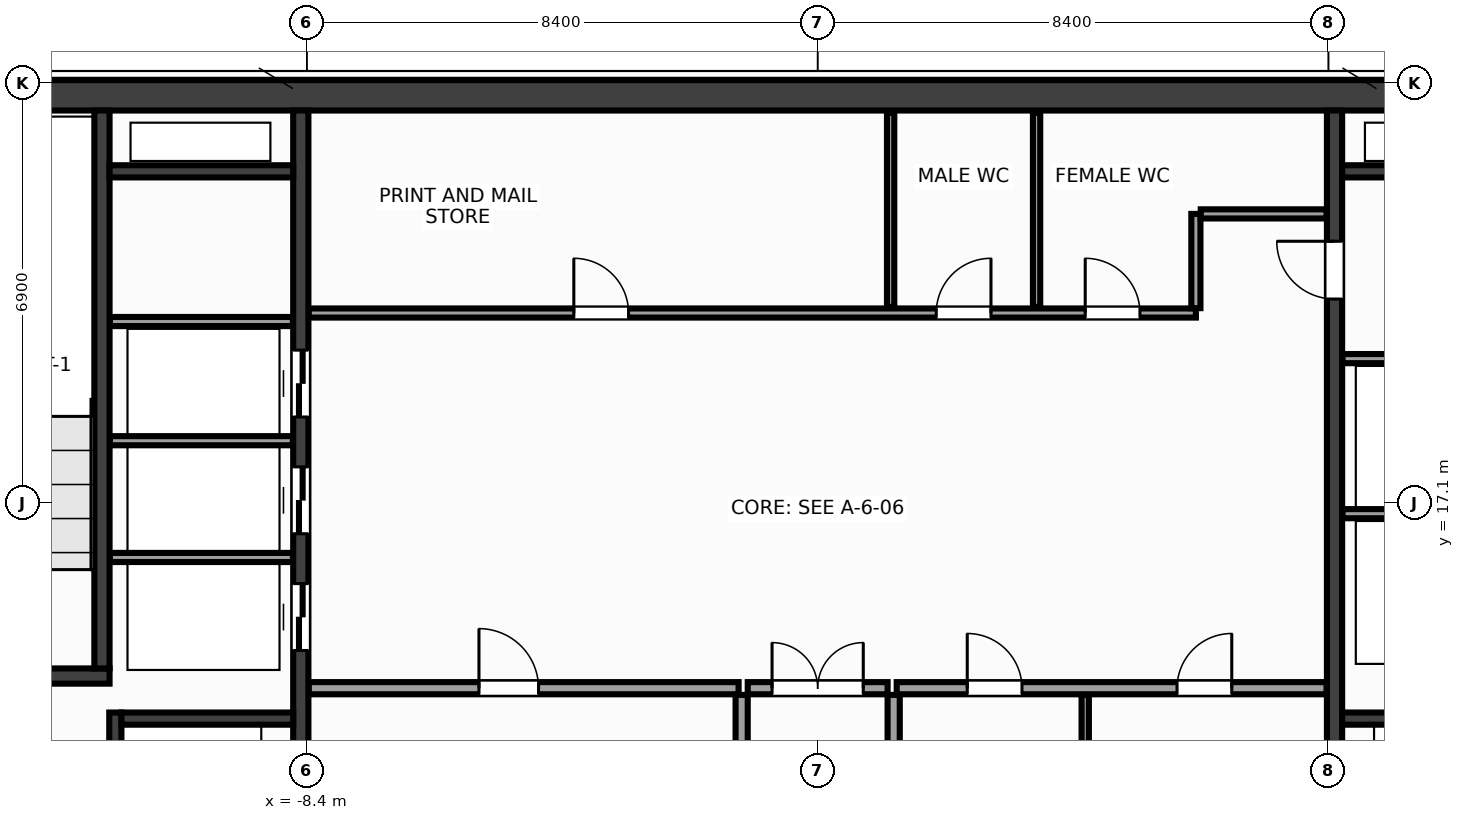
"""IFC4 building model, lengths in metres.
Left out: names, types, materials, properties, quantities, classifications, styles, units other than length and angle.
Written with IfcOpenShell. Run it as: python <this file> out.ifc"""

import sys

from ifc_helpers import new_model, si_unit, direction, frame, frame_2d, origin, place, context, subcontext, project, spatial, rectangle, extrude, source, transform, mapped, element, fill, save


model = new_model("IFC4")
c1 = context("Model", 3, precision=1e-05, world=origin(), true_north=direction((0.0, 1.0)))
c2 = subcontext(c1, "Body", "Model", "MODEL_VIEW")
j1 = project(units=[si_unit("LENGTHUNIT", "METRE"), si_unit("PLANEANGLEUNIT", "RADIAN")], contexts=[c1])
p1 = place(None, origin())
s1 = spatial("IfcSite", under=j1, at=p1, CompositionType="ELEMENT")
p2 = place(p1, origin())
s2 = spatial("IfcBuilding", under=s1, at=p2, CompositionType="ELEMENT")
p3 = place(p2, frame((0.0, 0.0, 279.2)))
s3 = spatial("IfcBuildingStorey", under=s2, at=p3, CompositionType="ELEMENT", Elevation=279.2)
m1 = source(origin(), c2, "Body", "SweptSolid", [
    extrude(rectangle(XDim=31.7, YDim=0.5, at=frame_2d((15.85, 0.0))), origin(), (0.0, 0.0, 1.0), 3.6),
])
p4 = place(p3, frame((-15.85, 23.8, 0.0), z_axis=(0.0, 0.0, 1.0), x_axis=(1.0, 0.0, 0.0)))
e1 = element("IfcWall", 1, at=p4, inside=s3, PredefinedType="SHEAR", context=c2, shape_type="MappedRepresentation", body=[
    mapped(m1, transform((0.0, 0.0, 0.0), x_axis=(1.0, 0.0, 0.0), y_axis=(0.0, 1.0, 0.0), z_axis=(0.0, 0.0, 1.0), scale=1.0)),
])
m2 = source(origin(), c2, "Body", "SweptSolid", [
    extrude(rectangle(XDim=13.1, YDim=0.25, at=frame_2d((6.55, 0.0))), origin(), (0.0, 0.0, 1.0), 3.6),
])
p5 = place(p3, frame((-8.5, 10.45, 0.0), z_axis=(0.0, 0.0, 1.0), x_axis=(0.0, 1.0, 0.0)))
e2 = element("IfcWall", 2, at=p5, inside=s3, PredefinedType="SHEAR", context=c2, shape_type="MappedRepresentation", body=[
    mapped(m2, transform((0.0, 0.0, 0.0), x_axis=(1.0, 0.0, 0.0), y_axis=(0.0, 1.0, 0.0), z_axis=(0.0, 0.0, 1.0), scale=1.0)),
])
p6 = place(p5, frame((4.22, 0.0, 0.0)))
e3 = element("IfcOpeningElement", 3, at=p6, cuts=e2, PredefinedType="OPENING", context=c2, shape_type="SweptSolid", body=[
    extrude(rectangle(XDim=1.1, YDim=2.15, at=frame_2d((0.55, 1.075))), frame((0.0, 0.137, 0.0), z_axis=(0.0, -1.0, 0.0), x_axis=(1.0, 0.0, 0.0)), (0.0, 0.0, 1.0), 0.274),
])
p7 = place(p5, frame((6.14, 0.0, 0.0)))
e4 = element("IfcOpeningElement", 4, at=p7, cuts=e2, PredefinedType="OPENING", context=c2, shape_type="SweptSolid", body=[
    extrude(rectangle(XDim=1.1, YDim=2.15, at=frame_2d((0.55, 1.075))), frame((0.0, 0.137, 0.0), z_axis=(0.0, -1.0, 0.0), x_axis=(1.0, 0.0, 0.0)), (0.0, 0.0, 1.0), 0.274),
])
p8 = place(p5, frame((8.06, 0.0, 0.0)))
e5 = element("IfcOpeningElement", 5, at=p8, cuts=e2, PredefinedType="OPENING", context=c2, shape_type="SweptSolid", body=[
    extrude(rectangle(XDim=1.1, YDim=2.15, at=frame_2d((0.55, 1.075))), frame((0.0, 0.137, 0.0), z_axis=(0.0, -1.0, 0.0), x_axis=(1.0, 0.0, 0.0)), (0.0, 0.0, 1.0), 0.274),
])
p9 = place(p3, frame((8.5, 10.45, 0.0), z_axis=(0.0, 0.0, 1.0), x_axis=(0.0, 1.0, 0.0)))
e6 = element("IfcWall", 6, at=p9, inside=s3, PredefinedType="SHEAR", context=c2, shape_type="MappedRepresentation", body=[
    mapped(m2, transform((0.0, 0.0, 0.0), x_axis=(1.0, 0.0, 0.0), y_axis=(0.0, 1.0, 0.0), z_axis=(0.0, 0.0, 1.0), scale=1.0)),
])
p10 = place(p9, frame((10.0, 0.0, 0.0)))
e7 = element("IfcOpeningElement", 7, at=p10, cuts=e6, PredefinedType="OPENING", context=c2, shape_type="SweptSolid", body=[
    extrude(rectangle(XDim=0.95, YDim=2.15, at=frame_2d((0.475, 1.075))), frame((0.0, 0.137, 0.0), z_axis=(0.0, -1.0, 0.0), x_axis=(1.0, 0.0, 0.0)), (0.0, 0.0, 1.0), 0.274),
])
m3 = source(origin(), c2, "Body", "SweptSolid", [
    extrude(rectangle(XDim=3.705, YDim=0.25, at=frame_2d((1.853, 0.0))), origin(), (0.0, 0.0, 1.0), 3.6),
])
p11 = place(p3, frame((-15.35, 14.25, 0.0), z_axis=(0.0, 0.0, 1.0), x_axis=(1.0, 0.0, 0.0)))
e8 = element("IfcWall", 8, at=p11, inside=s3, PredefinedType="SHEAR", context=c2, shape_type="MappedRepresentation", body=[
    mapped(m3, transform((0.0, 0.0, 0.0), x_axis=(1.0, 0.0, 0.0), y_axis=(0.0, 1.0, 0.0), z_axis=(0.0, 0.0, 1.0), scale=1.0)),
])
p12 = place(p11, frame((0.95, 0.0, 0.0)))
e9 = element("IfcOpeningElement", 9, at=p12, cuts=e8, PredefinedType="OPENING", context=c2, shape_type="SweptSolid", body=[
    extrude(rectangle(XDim=1.6, YDim=2.15, at=frame_2d((0.8, 1.075))), frame((0.0, 0.137, 0.0), z_axis=(0.0, -1.0, 0.0), x_axis=(1.0, 0.0, 0.0)), (0.0, 0.0, 1.0), 0.274),
])
m4 = source(origin(), c2, "Body", "SweptSolid", [
    extrude(rectangle(XDim=9.175, YDim=0.25, at=frame_2d((4.587, 0.0))), origin(), (0.0, 0.0, 1.0), 3.6),
])
p13 = place(p3, frame((-11.77, 14.375, 0.0), z_axis=(0.0, 0.0, 1.0), x_axis=(0.0, 1.0, 0.0)))
e10 = element("IfcWall", 10, at=p13, inside=s3, PredefinedType="SHEAR", context=c2, shape_type="MappedRepresentation", body=[
    mapped(m4, transform((0.0, 0.0, 0.0), x_axis=(1.0, 0.0, 0.0), y_axis=(0.0, 1.0, 0.0), z_axis=(0.0, 0.0, 1.0), scale=1.0)),
])
m5 = source(origin(), c2, "Body", "SweptSolid", [
    extrude(rectangle(XDim=3.2, YDim=0.2, at=frame_2d((1.6, 0.0))), origin(), (0.0, 0.0, 1.0), 3.6),
])
p14 = place(p3, frame((-11.55, 10.45, 0.0), z_axis=(0.0, 0.0, 1.0), x_axis=(0.0, 1.0, 0.0)))
e11 = element("IfcWall", 11, at=p14, inside=s3, PredefinedType="SHEAR", context=c2, shape_type="MappedRepresentation", body=[
    mapped(m5, transform((0.0, 0.0, 0.0), x_axis=(1.0, 0.0, 0.0), y_axis=(0.0, 1.0, 0.0), z_axis=(0.0, 0.0, 1.0), scale=1.0)),
])
p15 = place(p14, frame((0.9, 0.0, 0.0)))
e12 = element("IfcOpeningElement", 12, at=p15, cuts=e11, PredefinedType="OPENING", context=c2, shape_type="SweptSolid", body=[
    extrude(rectangle(XDim=1.1, YDim=2.15, at=frame_2d((0.55, 1.075))), frame((0.0, 0.112, 0.0), z_axis=(0.0, -1.0, 0.0), x_axis=(1.0, 0.0, 0.0)), (0.0, 0.0, 1.0), 0.224),
])
m6 = source(origin(), c2, "Body", "SweptSolid", [
    extrude(rectangle(XDim=2.825, YDim=0.2, at=frame_2d((1.413, 0.0))), origin(), (0.0, 0.0, 1.0), 3.6),
])
for number, where, z_axis, x_axis in (
    (13, (-11.45, 13.55, 0.0), (0.0, 0.0, 1.0), (1.0, 0.0, 0.0)),
    (14, (8.625, 13.55, 0.0), (0.0, 0.0, 1.0), (1.0, 0.0, 0.0)),
):
    element("IfcWall", number, at=place(p3, frame(where, z_axis=z_axis, x_axis=x_axis)), inside=s3, PredefinedType="SHEAR", context=c2, shape_type="MappedRepresentation", body=[
        mapped(m6, transform((0.0, 0.0, 0.0), x_axis=(1.0, 0.0, 0.0), y_axis=(0.0, 1.0, 0.0), z_axis=(0.0, 0.0, 1.0), scale=1.0)),
    ])
m7 = source(origin(), c2, "Body", "SweptSolid", [
    extrude(rectangle(XDim=3.02, YDim=0.2, at=frame_2d((1.51, 0.0))), origin(), (0.0, 0.0, 1.0), 3.6),
])
for number, where, z_axis, x_axis in (
    (15, (-11.645, 22.55, 0.0), (0.0, 0.0, 1.0), (1.0, 0.0, 0.0)),
    (16, (8.625, 22.55, 0.0), (0.0, 0.0, 1.0), (1.0, 0.0, 0.0)),
):
    element("IfcWall", number, at=place(p3, frame(where, z_axis=z_axis, x_axis=x_axis)), inside=s3, PredefinedType="SHEAR", context=c2, shape_type="MappedRepresentation", body=[
        mapped(m7, transform((0.0, 0.0, 0.0), x_axis=(1.0, 0.0, 0.0), y_axis=(0.0, 1.0, 0.0), z_axis=(0.0, 0.0, 1.0), scale=1.0)),
    ])
m8 = source(origin(), c2, "Body", "SweptSolid", [
    extrude(rectangle(XDim=3.01, YDim=0.15, at=frame_2d((1.505, 0.0))), origin(), (0.0, 0.0, 1.0), 3.37),
])
for number, where, z_axis, x_axis in (
    (17, (-11.64, 16.2, 0.0), (0.0, 0.0, 1.0), (1.0, 0.0, 0.0)),
    (18, (-11.64, 18.12, 0.0), (0.0, 0.0, 1.0), (1.0, 0.0, 0.0)),
    (19, (-11.64, 20.08, 0.0), (0.0, 0.0, 1.0), (1.0, 0.0, 0.0)),
    (20, (8.63, 16.92, 0.0), (0.0, 0.0, 1.0), (1.0, 0.0, 0.0)),
    (21, (8.63, 19.47, 0.0), (0.0, 0.0, 1.0), (1.0, 0.0, 0.0)),
):
    element("IfcWall", number, at=place(p3, frame(where, z_axis=z_axis, x_axis=x_axis)), inside=s3, PredefinedType="PARTITIONING", context=c2, shape_type="MappedRepresentation", body=[
        mapped(m8, transform((0.0, 0.0, 0.0), x_axis=(1.0, 0.0, 0.0), y_axis=(0.0, 1.0, 0.0), z_axis=(0.0, 0.0, 1.0), scale=1.0)),
    ])
m9 = source(origin(), c2, "Body", "SweptSolid", [
    extrude(rectangle(XDim=7.07, YDim=0.2, at=frame_2d((3.535, 0.0))), origin(), (0.0, 0.0, 1.0), 3.37),
])
p16 = place(p3, frame((-8.37, 14.05, 0.0), z_axis=(0.0, 0.0, 1.0), x_axis=(1.0, 0.0, 0.0)))
e22 = element("IfcWall", 22, at=p16, inside=s3, PredefinedType="PARTITIONING", context=c2, shape_type="MappedRepresentation", body=[
    mapped(m9, transform((0.0, 0.0, 0.0), x_axis=(1.0, 0.0, 0.0), y_axis=(0.0, 1.0, 0.0), z_axis=(0.0, 0.0, 1.0), scale=1.0)),
])
p17 = place(p16, frame((2.8, 0.0, 0.0)))
e23 = element("IfcOpeningElement", 23, at=p17, cuts=e22, PredefinedType="OPENING", context=c2, shape_type="SweptSolid", body=[
    extrude(rectangle(XDim=0.98, YDim=2.15, at=frame_2d((0.49, 1.075))), frame((0.0, 0.112, 0.0), z_axis=(0.0, -1.0, 0.0), x_axis=(1.0, 0.0, 0.0)), (0.0, 0.0, 1.0), 0.224),
])
p18 = place(p3, frame((1.3, 14.05, 0.0), z_axis=(0.0, 0.0, 1.0), x_axis=(1.0, 0.0, 0.0)))
e24 = element("IfcWall", 24, at=p18, inside=s3, PredefinedType="PARTITIONING", context=c2, shape_type="MappedRepresentation", body=[
    mapped(m9, transform((0.0, 0.0, 0.0), x_axis=(1.0, 0.0, 0.0), y_axis=(0.0, 1.0, 0.0), z_axis=(0.0, 0.0, 1.0), scale=1.0)),
])
p19 = place(p18, frame((1.16, 0.0, 0.0)))
e25 = element("IfcOpeningElement", 25, at=p19, cuts=e24, PredefinedType="OPENING", context=c2, shape_type="SweptSolid", body=[
    extrude(rectangle(XDim=0.9, YDim=2.15, at=frame_2d((0.45, 1.075))), frame((0.0, 0.112, 0.0), z_axis=(0.0, -1.0, 0.0), x_axis=(1.0, 0.0, 0.0)), (0.0, 0.0, 1.0), 0.224),
])
p20 = place(p18, frame((4.61, 0.0, 0.0)))
e26 = element("IfcOpeningElement", 26, at=p20, cuts=e24, PredefinedType="OPENING", context=c2, shape_type="SweptSolid", body=[
    extrude(rectangle(XDim=0.9, YDim=2.15, at=frame_2d((0.45, 1.075))), frame((0.0, 0.112, 0.0), z_axis=(0.0, -1.0, 0.0), x_axis=(1.0, 0.0, 0.0)), (0.0, 0.0, 1.0), 0.224),
])
m10 = source(origin(), c2, "Body", "SweptSolid", [
    extrude(rectangle(XDim=3.49, YDim=0.2, at=frame_2d((1.745, 0.0))), origin(), (0.0, 0.0, 1.0), 3.37),
])
for number, where, z_axis, x_axis in (
    (27, (-1.25, 10.45, 0.0), (0.0, 0.0, 1.0), (0.0, 1.0, 0.0)),
    (28, (1.25, 10.45, 0.0), (0.0, 0.0, 1.0), (0.0, 1.0, 0.0)),
):
    element("IfcWall", number, at=place(p3, frame(where, z_axis=z_axis, x_axis=x_axis)), inside=s3, PredefinedType="PARTITIONING", context=c2, shape_type="MappedRepresentation", body=[
        mapped(m10, transform((0.0, 0.0, 0.0), x_axis=(1.0, 0.0, 0.0), y_axis=(0.0, 1.0, 0.0), z_axis=(0.0, 0.0, 1.0), scale=1.0)),
    ])
m11 = source(origin(), c2, "Body", "SweptSolid", [
    extrude(rectangle(XDim=2.3, YDim=0.2, at=frame_2d((1.15, 0.0))), origin(), (0.0, 0.0, 1.0), 3.37),
])
p21 = place(p3, frame((-1.15, 14.05, 0.0), z_axis=(0.0, 0.0, 1.0), x_axis=(1.0, 0.0, 0.0)))
e29 = element("IfcWall", 29, at=p21, inside=s3, PredefinedType="PARTITIONING", context=c2, shape_type="MappedRepresentation", body=[
    mapped(m11, transform((0.0, 0.0, 0.0), x_axis=(1.0, 0.0, 0.0), y_axis=(0.0, 1.0, 0.0), z_axis=(0.0, 0.0, 1.0), scale=1.0)),
])
p22 = place(p21, frame((0.4, 0.0, 0.0)))
e30 = element("IfcOpeningElement", 30, at=p22, cuts=e29, PredefinedType="OPENING", context=c2, shape_type="SweptSolid", body=[
    extrude(rectangle(XDim=1.5, YDim=2.2, at=frame_2d((0.75, 1.1))), frame((0.0, 0.112, 0.0), z_axis=(0.0, -1.0, 0.0), x_axis=(1.0, 0.0, 0.0)), (0.0, 0.0, 1.0), 0.224),
])
m12 = source(origin(), c2, "Body", "SweptSolid", [
    extrude(rectangle(XDim=14.59, YDim=0.15, at=frame_2d((7.295, 0.0))), origin(), (0.0, 0.0, 1.0), 3.37),
])
p23 = place(p3, frame((-8.37, 20.22, 0.0), z_axis=(0.0, 0.0, 1.0), x_axis=(1.0, 0.0, 0.0)))
e31 = element("IfcWall", 31, at=p23, inside=s3, PredefinedType="PARTITIONING", context=c2, shape_type="MappedRepresentation", body=[
    mapped(m12, transform((0.0, 0.0, 0.0), x_axis=(1.0, 0.0, 0.0), y_axis=(0.0, 1.0, 0.0), z_axis=(0.0, 0.0, 1.0), scale=1.0)),
])
p24 = place(p23, frame((4.36, 0.0, 0.0)))
e32 = element("IfcOpeningElement", 32, at=p24, cuts=e31, PredefinedType="OPENING", context=c2, shape_type="SweptSolid", body=[
    extrude(rectangle(XDim=0.9, YDim=2.15, at=frame_2d((0.45, 1.075))), frame((0.0, 0.087, 0.0), z_axis=(0.0, -1.0, 0.0), x_axis=(1.0, 0.0, 0.0)), (0.0, 0.0, 1.0), 0.174),
])
p25 = place(p23, frame((10.32, 0.0, 0.0)))
e33 = element("IfcOpeningElement", 33, at=p25, cuts=e31, PredefinedType="OPENING", context=c2, shape_type="SweptSolid", body=[
    extrude(rectangle(XDim=0.9, YDim=2.15, at=frame_2d((0.45, 1.075))), frame((0.0, 0.087, 0.0), z_axis=(0.0, -1.0, 0.0), x_axis=(1.0, 0.0, 0.0)), (0.0, 0.0, 1.0), 0.174),
])
p26 = place(p23, frame((12.77, 0.0, 0.0)))
e34 = element("IfcOpeningElement", 34, at=p26, cuts=e31, PredefinedType="OPENING", context=c2, shape_type="SweptSolid", body=[
    extrude(rectangle(XDim=0.9, YDim=2.15, at=frame_2d((0.45, 1.075))), frame((0.0, 0.087, 0.0), z_axis=(0.0, -1.0, 0.0), x_axis=(1.0, 0.0, 0.0)), (0.0, 0.0, 1.0), 0.174),
])
m13 = source(origin(), c2, "Body", "SweptSolid", [
    extrude(rectangle(XDim=1.55, YDim=0.15, at=frame_2d((0.775, 0.0))), origin(), (0.0, 0.0, 1.0), 3.37),
])
p27 = place(p3, frame((6.22, 20.3, 0.0), z_axis=(0.0, 0.0, 1.0), x_axis=(0.0, 1.0, 0.0)))
e35 = element("IfcWall", 35, at=p27, inside=s3, PredefinedType="PARTITIONING", context=c2, shape_type="MappedRepresentation", body=[
    mapped(m13, transform((0.0, 0.0, 0.0), x_axis=(1.0, 0.0, 0.0), y_axis=(0.0, 1.0, 0.0), z_axis=(0.0, 0.0, 1.0), scale=1.0)),
])
m14 = source(origin(), c2, "Body", "SweptSolid", [
    extrude(rectangle(XDim=2.07, YDim=0.15, at=frame_2d((1.035, 0.0))), origin(), (0.0, 0.0, 1.0), 3.37),
])
p28 = place(p3, frame((6.3, 21.85, 0.0), z_axis=(0.0, 0.0, 1.0), x_axis=(1.0, 0.0, 0.0)))
e36 = element("IfcWall", 36, at=p28, inside=s3, PredefinedType="PARTITIONING", context=c2, shape_type="MappedRepresentation", body=[
    mapped(m14, transform((0.0, 0.0, 0.0), x_axis=(1.0, 0.0, 0.0), y_axis=(0.0, 1.0, 0.0), z_axis=(0.0, 0.0, 1.0), scale=1.0)),
])
m15 = source(origin(), c2, "Body", "SweptSolid", [
    extrude(rectangle(XDim=3.49, YDim=0.12, at=frame_2d((1.745, 0.0))), origin(), (0.0, 0.0, 1.0), 3.37),
])
p29 = place(p3, frame((4.4, 10.45, 0.0), z_axis=(0.0, 0.0, 1.0), x_axis=(0.0, 1.0, 0.0)))
e37 = element("IfcWall", 37, at=p29, inside=s3, PredefinedType="PARTITIONING", context=c2, shape_type="MappedRepresentation", body=[
    mapped(m15, transform((0.0, 0.0, 0.0), x_axis=(1.0, 0.0, 0.0), y_axis=(0.0, 1.0, 0.0), z_axis=(0.0, 0.0, 1.0), scale=1.0)),
])
m16 = source(origin(), c2, "Body", "SweptSolid", [
    extrude(rectangle(XDim=3.19, YDim=0.12, at=frame_2d((1.595, 0.0))), origin(), (0.0, 0.0, 1.0), 3.37),
])
for number, where, z_axis, x_axis in (
    (38, (1.2, 20.32, 0.0), (0.0, 0.0, 1.0), (0.0, 1.0, 0.0)),
    (39, (3.6, 20.32, 0.0), (0.0, 0.0, 1.0), (0.0, 1.0, 0.0)),
):
    element("IfcWall", number, at=place(p3, frame(where, z_axis=z_axis, x_axis=x_axis)), inside=s3, PredefinedType="PARTITIONING", context=c2, shape_type="MappedRepresentation", body=[
        mapped(m16, transform((0.0, 0.0, 0.0), x_axis=(1.0, 0.0, 0.0), y_axis=(0.0, 1.0, 0.0), z_axis=(0.0, 0.0, 1.0), scale=1.0)),
    ])
m17 = source(origin(), c2, "Body", "SweptSolid", [
    extrude(rectangle(XDim=1.1, YDim=2.15, at=frame_2d((0.55, 1.075))), frame((0.0, 0.025, 0.0), z_axis=(0.0, -1.0, 0.0), x_axis=(1.0, 0.0, 0.0)), (0.0, 0.0, 1.0), 0.05),
])
p30 = place(p6, origin())
e40 = element("IfcDoor", 40, at=p30, inside=s3, OperationType="DOUBLE_DOOR_SLIDING", PredefinedType="DOOR", context=c2, shape_type="MappedRepresentation", body=[
    mapped(m17, transform((0.0, 0.0, 0.0), x_axis=(1.0, 0.0, 0.0), y_axis=(0.0, 1.0, 0.0), z_axis=(0.0, 0.0, 1.0), scale=1.0)),
])
fill(e3, e40)
p31 = place(p7, origin())
e41 = element("IfcDoor", 41, at=p31, inside=s3, OperationType="DOUBLE_DOOR_SLIDING", PredefinedType="DOOR", context=c2, shape_type="MappedRepresentation", body=[
    mapped(m17, transform((0.0, 0.0, 0.0), x_axis=(1.0, 0.0, 0.0), y_axis=(0.0, 1.0, 0.0), z_axis=(0.0, 0.0, 1.0), scale=1.0)),
])
fill(e4, e41)
p32 = place(p8, origin())
e42 = element("IfcDoor", 42, at=p32, inside=s3, OperationType="DOUBLE_DOOR_SLIDING", PredefinedType="DOOR", context=c2, shape_type="MappedRepresentation", body=[
    mapped(m17, transform((0.0, 0.0, 0.0), x_axis=(1.0, 0.0, 0.0), y_axis=(0.0, 1.0, 0.0), z_axis=(0.0, 0.0, 1.0), scale=1.0)),
])
fill(e5, e42)
m18 = source(origin(), c2, "Body", "SweptSolid", [
    extrude(rectangle(XDim=0.95, YDim=2.15, at=frame_2d((0.475, 1.075))), frame((0.0, 0.025, 0.0), z_axis=(0.0, -1.0, 0.0), x_axis=(1.0, 0.0, 0.0)), (0.0, 0.0, 1.0), 0.05),
])
p33 = place(p10, origin())
e43 = element("IfcDoor", 43, at=p33, inside=s3, OperationType="SINGLE_SWING_RIGHT", PredefinedType="DOOR", context=c2, shape_type="MappedRepresentation", body=[
    mapped(m18, transform((0.0, 0.0, 0.0), x_axis=(1.0, 0.0, 0.0), y_axis=(0.0, 1.0, 0.0), z_axis=(0.0, 0.0, 1.0), scale=1.0)),
])
fill(e7, e43)
m19 = source(origin(), c2, "Body", "SweptSolid", [
    extrude(rectangle(XDim=0.98, YDim=2.15, at=frame_2d((0.49, 1.075))), frame((0.0, 0.025, 0.0), z_axis=(0.0, -1.0, 0.0), x_axis=(1.0, 0.0, 0.0)), (0.0, 0.0, 1.0), 0.05),
])
p34 = place(p17, origin())
e44 = element("IfcDoor", 44, at=p34, inside=s3, OperationType="SINGLE_SWING_LEFT", PredefinedType="DOOR", context=c2, shape_type="MappedRepresentation", body=[
    mapped(m19, transform((0.0, 0.0, 0.0), x_axis=(1.0, 0.0, 0.0), y_axis=(0.0, 1.0, 0.0), z_axis=(0.0, 0.0, 1.0), scale=1.0)),
])
fill(e23, e44)
m20 = source(origin(), c2, "Body", "SweptSolid", [
    extrude(rectangle(XDim=0.9, YDim=2.15, at=frame_2d((0.45, 1.075))), frame((0.0, 0.025, 0.0), z_axis=(0.0, -1.0, 0.0), x_axis=(1.0, 0.0, 0.0)), (0.0, 0.0, 1.0), 0.05),
])
p35 = place(p19, origin())
e45 = element("IfcDoor", 45, at=p35, inside=s3, OperationType="SINGLE_SWING_LEFT", PredefinedType="DOOR", context=c2, shape_type="MappedRepresentation", body=[
    mapped(m20, transform((0.0, 0.0, 0.0), x_axis=(1.0, 0.0, 0.0), y_axis=(0.0, 1.0, 0.0), z_axis=(0.0, 0.0, 1.0), scale=1.0)),
])
fill(e25, e45)
p36 = place(p20, origin())
e46 = element("IfcDoor", 46, at=p36, inside=s3, OperationType="SINGLE_SWING_RIGHT", PredefinedType="DOOR", context=c2, shape_type="MappedRepresentation", body=[
    mapped(m20, transform((0.0, 0.0, 0.0), x_axis=(1.0, 0.0, 0.0), y_axis=(0.0, 1.0, 0.0), z_axis=(0.0, 0.0, 1.0), scale=1.0)),
])
fill(e26, e46)
m21 = source(origin(), c2, "Body", "SweptSolid", [
    extrude(rectangle(XDim=1.5, YDim=2.2, at=frame_2d((0.75, 1.1))), frame((0.0, 0.025, 0.0), z_axis=(0.0, -1.0, 0.0), x_axis=(1.0, 0.0, 0.0)), (0.0, 0.0, 1.0), 0.05),
])
p37 = place(p22, origin())
e47 = element("IfcDoor", 47, at=p37, inside=s3, OperationType="DOUBLE_DOOR_SINGLE_SWING", PredefinedType="DOOR", context=c2, shape_type="MappedRepresentation", body=[
    mapped(m21, transform((0.0, 0.0, 0.0), x_axis=(1.0, 0.0, 0.0), y_axis=(0.0, 1.0, 0.0), z_axis=(0.0, 0.0, 1.0), scale=1.0)),
])
fill(e30, e47)
p38 = place(p24, origin())
e48 = element("IfcDoor", 48, at=p38, inside=s3, OperationType="SINGLE_SWING_LEFT", PredefinedType="DOOR", context=c2, shape_type="MappedRepresentation", body=[
    mapped(m20, transform((0.0, 0.0, 0.0), x_axis=(1.0, 0.0, 0.0), y_axis=(0.0, 1.0, 0.0), z_axis=(0.0, 0.0, 1.0), scale=1.0)),
])
fill(e32, e48)
p39 = place(p25, origin())
e49 = element("IfcDoor", 49, at=p39, inside=s3, OperationType="SINGLE_SWING_RIGHT", PredefinedType="DOOR", context=c2, shape_type="MappedRepresentation", body=[
    mapped(m20, transform((0.0, 0.0, 0.0), x_axis=(1.0, 0.0, 0.0), y_axis=(0.0, 1.0, 0.0), z_axis=(0.0, 0.0, 1.0), scale=1.0)),
])
fill(e33, e49)
p40 = place(p26, origin())
e50 = element("IfcDoor", 50, at=p40, inside=s3, OperationType="SINGLE_SWING_LEFT", PredefinedType="DOOR", context=c2, shape_type="MappedRepresentation", body=[
    mapped(m20, transform((0.0, 0.0, 0.0), x_axis=(1.0, 0.0, 0.0), y_axis=(0.0, 1.0, 0.0), z_axis=(0.0, 0.0, 1.0), scale=1.0)),
])
fill(e34, e50)
save(model, sys.argv[1])
